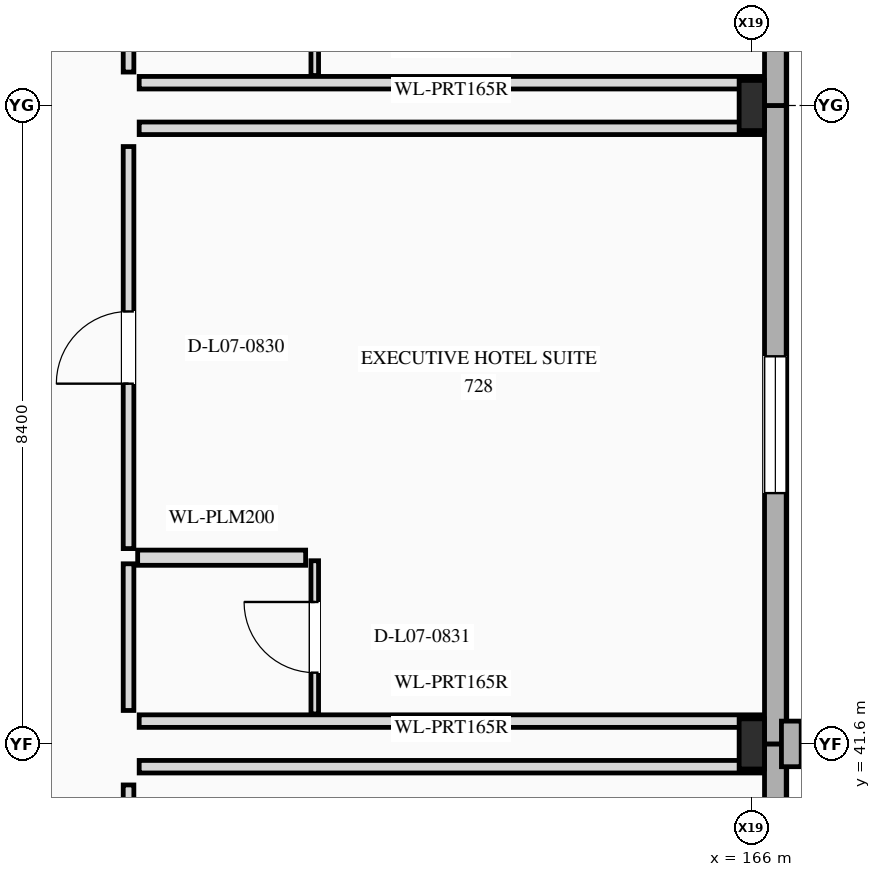
"""IFC4 building model, lengths in metres.
Left out: names, types, materials, properties, quantities, classifications, styles, units other than length and angle.
Written with IfcOpenShell. Run it as: python <this file> out.ifc"""

import sys

from ifc_helpers import new_model, si_unit, direction, frame, frame_2d, origin, origin_2d, place, context, subcontext, project, spatial, rectangle, i_section, extrude, element, fill, save


model = new_model("IFC4")
c1 = context("Model", 3, precision=1e-05, world=origin(), true_north=direction((0.0, 1.0)))
c2 = subcontext(c1, "Body", "Model", "MODEL_VIEW")
j1 = project(units=[si_unit("LENGTHUNIT", "METRE"), si_unit("PLANEANGLEUNIT", "RADIAN")], contexts=[c1])
p1 = place(None, origin())
s1 = spatial("IfcSite", under=j1, at=p1, CompositionType="ELEMENT")
p2 = place(p1, origin())
s2 = spatial("IfcBuilding", under=s1, at=p2, CompositionType="ELEMENT")
p3 = place(p2, frame((0.0, 0.0, 30.6)))
s3 = spatial("IfcBuildingStorey", under=s2, at=p3, CompositionType="ELEMENT", Elevation=30.6)
for number, where, z_axis, x_axis in (
    (1, (166.0, 41.6, 0.0), (0.0, 0.0, 1.0), (1.0, 0.0, 0.0)),
    (2, (166.0, 50.0, 0.0), (0.0, 0.0, 1.0), (1.0, 0.0, 0.0)),
):
    element("IfcColumn", number, at=place(p3, frame(where, z_axis=z_axis, x_axis=x_axis)), inside=s3, PredefinedType="COLUMN", context=c2, shape_type="SweptSolid", body=[
        extrude(i_section(OverallWidth=0.333, OverallDepth=0.66, WebThickness=0.024, FlangeThickness=0.044, at=origin_2d()), origin(), (0.0, 0.0, 1.0), 3.5),
    ])
p4 = place(p3, frame((166.31, 39.46, 0.0), z_axis=(0.0, 0.0, 1.0), x_axis=(0.0, 1.0, 0.0)))
e3 = element("IfcWall", 3, at=p4, inside=s3, PredefinedType="STANDARD", context=c2, shape_type="SweptSolid", body=[
    extrude(rectangle(XDim=2.14, YDim=0.285, at=frame_2d((1.07, 0.0))), origin(), (0.0, 0.0, 1.0), 3.5),
])
p5 = place(p3, frame((166.31, 41.6, 0.0), z_axis=(0.0, 0.0, 1.0), x_axis=(0.0, 1.0, 0.0)))
e4 = element("IfcWall", 4, at=p5, inside=s3, PredefinedType="STANDARD", context=c2, shape_type="SweptSolid", body=[
    extrude(rectangle(XDim=8.4, YDim=0.285, at=frame_2d((4.2, 0.0))), origin(), (0.0, 0.0, 1.0), 3.5),
])
p6 = place(p5, frame((3.3, 0.0, 0.85)))
e5 = element("IfcOpeningElement", 5, at=p6, cuts=e4, PredefinedType="OPENING", context=c2, shape_type="SweptSolid", body=[
    extrude(rectangle(XDim=1.8, YDim=1.8, at=frame_2d((0.9, 0.9))), frame((0.0, 0.152, 0.0), z_axis=(0.0, -1.0, 0.0), x_axis=(1.0, 0.0, 0.0)), (0.0, 0.0, 1.0), 0.305),
])
p7 = place(p3, frame((166.52, 41.3, 0.0), z_axis=(0.0, 0.0, 1.0), x_axis=(0.0, 1.0, 0.0)))
e6 = element("IfcWall", 6, at=p7, inside=s3, PredefinedType="ELEMENTEDWALL", context=c2, shape_type="SweptSolid", body=[
    extrude(rectangle(XDim=0.6, YDim=0.26, at=frame_2d((0.3, 0.0))), origin(), (0.0, 0.0, 1.0), 3.5),
])
p8 = place(p3, frame((166.31, 50.0, 0.0), z_axis=(0.0, 0.0, 1.0), x_axis=(0.0, 1.0, 0.0)))
e7 = element("IfcWall", 7, at=p8, inside=s3, PredefinedType="STANDARD", context=c2, shape_type="SweptSolid", body=[
    extrude(rectangle(XDim=1.34, YDim=0.285, at=frame_2d((0.67, 0.0))), origin(), (0.0, 0.0, 1.0), 3.5),
])
p9 = place(p3, frame((157.8, 35.77, 0.0), z_axis=(0.0, 0.0, 1.0), x_axis=(0.0, 1.0, 0.0)))
e8 = element("IfcWall", 8, at=p9, inside=s3, PredefinedType="PARTITIONING", context=c2, shape_type="SweptSolid", body=[
    extrude(rectangle(XDim=5.29, YDim=0.14, at=frame_2d((2.645, 0.0))), origin(), (0.0, 0.0, 1.0), 3.2),
])
p10 = place(p9, frame((2.11, 0.0, 0.0)))
e9 = element("IfcOpeningElement", 9, at=p10, cuts=e8, PredefinedType="OPENING", context=c2, shape_type="SweptSolid", body=[
    extrude(rectangle(XDim=1.07, YDim=2.4, at=frame_2d((0.535, 1.2))), frame((0.0, 0.08, 0.0), z_axis=(0.0, -1.0, 0.0), x_axis=(1.0, 0.0, 0.0)), (0.0, 0.0, 1.0), 0.16),
])
p11 = place(p3, frame((157.94, 41.3, 0.0), z_axis=(0.0, 0.0, 1.0), x_axis=(1.0, 0.0, 0.0)))
e10 = element("IfcWall", 10, at=p11, inside=s3, PredefinedType="PARTITIONING", context=c2, shape_type="SweptSolid", body=[
    extrude(rectangle(XDim=8.213, YDim=0.165, at=frame_2d((4.106, 0.0))), origin(), (0.0, 0.0, 1.0), 2.59),
])
p12 = place(p3, frame((157.8, 42.04, 0.0), z_axis=(0.0, 0.0, 1.0), x_axis=(0.0, 1.0, 0.0)))
e11 = element("IfcWall", 11, at=p12, inside=s3, PredefinedType="PARTITIONING", context=c2, shape_type="SweptSolid", body=[
    extrude(rectangle(XDim=1.93, YDim=0.14, at=frame_2d((0.965, 0.0))), origin(), (0.0, 0.0, 1.0), 2.753),
])
p13 = place(p3, frame((157.8, 44.17, 0.0), z_axis=(0.0, 0.0, 1.0), x_axis=(0.0, 1.0, 0.0)))
e12 = element("IfcWall", 12, at=p13, inside=s3, PredefinedType="PARTITIONING", context=c2, shape_type="SweptSolid", body=[
    extrude(rectangle(XDim=5.29, YDim=0.14, at=frame_2d((2.645, 0.0))), origin(), (0.0, 0.0, 1.0), 2.753),
])
p14 = place(p13, frame((2.17, 0.0, 0.0)))
e13 = element("IfcOpeningElement", 13, at=p14, cuts=e12, PredefinedType="OPENING", context=c2, shape_type="SweptSolid", body=[
    extrude(rectangle(XDim=0.95, YDim=2.15, at=frame_2d((0.475, 1.075))), frame((0.0, 0.08, 0.0), z_axis=(0.0, -1.0, 0.0), x_axis=(1.0, 0.0, 0.0)), (0.0, 0.0, 1.0), 0.16),
])
for number, where, z_axis, x_axis in (
    (14, (157.94, 41.9, 0.0), (0.0, 0.0, 1.0), (1.0, 0.0, 0.0)),
    (15, (157.94, 49.7, 0.0), (0.0, 0.0, 1.0), (1.0, 0.0, 0.0)),
):
    element("IfcWall", number, at=place(p3, frame(where, z_axis=z_axis, x_axis=x_axis)), inside=s3, PredefinedType="PARTITIONING", context=c2, shape_type="SweptSolid", body=[
        extrude(rectangle(XDim=8.213, YDim=0.165, at=frame_2d((4.106, 0.0))), origin(), (0.0, 0.0, 1.0), 2.59),
    ])
p15 = place(p3, frame((157.92, 44.05, 0.0), z_axis=(0.0, 0.0, 1.0), x_axis=(1.0, 0.0, 0.0)))
e16 = element("IfcWall", 16, at=p15, inside=s3, PredefinedType="PLUMBINGWALL", context=c2, shape_type="SweptSolid", body=[
    extrude(rectangle(XDim=2.21, YDim=0.2, at=frame_2d((1.105, 0.0))), origin(), (0.0, 0.0, 1.0), 3.2),
])
p16 = place(p3, frame((160.25, 41.994, 0.0), z_axis=(0.0, 0.0, 1.0), x_axis=(0.0, 1.0, 0.0)))
e17 = element("IfcWall", 17, at=p16, inside=s3, PredefinedType="PARTITIONING", context=c2, shape_type="SweptSolid", body=[
    extrude(rectangle(XDim=2.016, YDim=0.1, at=frame_2d((1.008, 0.0))), origin(), (0.0, 0.0, 1.0), 2.753),
])
p17 = place(p16, frame((0.543, 0.0, 0.0)))
e18 = element("IfcOpeningElement", 18, at=p17, cuts=e17, PredefinedType="OPENING", context=c2, shape_type="SweptSolid", body=[
    extrude(rectangle(XDim=0.93, YDim=2.14, at=frame_2d((0.465, 1.07))), frame((0.0, 0.06, 0.0), z_axis=(0.0, -1.0, 0.0), x_axis=(1.0, 0.0, 0.0)), (0.0, 0.0, 1.0), 0.12),
])
p18 = place(p3, frame((157.8, 50.44, 0.0), z_axis=(0.0, 0.0, 1.0), x_axis=(0.0, 1.0, 0.0)))
e19 = element("IfcWall", 19, at=p18, inside=s3, PredefinedType="PARTITIONING", context=c2, shape_type="SweptSolid", body=[
    extrude(rectangle(XDim=1.93, YDim=0.14, at=frame_2d((0.965, 0.0))), origin(), (0.0, 0.0, 1.0), 3.2),
])
p19 = place(p3, frame((157.94, 50.3, 0.0), z_axis=(0.0, 0.0, 1.0), x_axis=(1.0, 0.0, 0.0)))
e20 = element("IfcWall", 20, at=p19, inside=s3, PredefinedType="PARTITIONING", context=c2, shape_type="SweptSolid", body=[
    extrude(rectangle(XDim=8.213, YDim=0.165, at=frame_2d((4.106, 0.0))), origin(), (0.0, 0.0, 1.0), 2.59),
])
p20 = place(p3, frame((160.25, 50.395, 0.0), z_axis=(0.0, 0.0, 1.0), x_axis=(0.0, 1.0, 0.0)))
e21 = element("IfcWall", 21, at=p20, inside=s3, PredefinedType="PARTITIONING", context=c2, shape_type="SweptSolid", body=[
    extrude(rectangle(XDim=2.015, YDim=0.1, at=frame_2d((1.008, 0.0))), origin(), (0.0, 0.0, 1.0), 3.2),
])
p21 = place(p20, frame((0.53, 0.0, 0.0)))
e22 = element("IfcOpeningElement", 22, at=p21, cuts=e21, PredefinedType="OPENING", context=c2, shape_type="SweptSolid", body=[
    extrude(rectangle(XDim=0.955, YDim=2.14, at=frame_2d((0.478, 1.07))), frame((0.0, 0.06, 0.0), z_axis=(0.0, -1.0, 0.0), x_axis=(1.0, 0.0, 0.0)), (0.0, 0.0, 1.0), 0.12),
])
p22 = place(p6, origin())
e23 = element("IfcWindow", 23, at=p22, inside=s3, PartitioningType="SINGLE_PANEL", PredefinedType="WINDOW", context=c2, shape_type="SweptSolid", body=[
    extrude(rectangle(XDim=1.8, YDim=1.8, at=frame_2d((0.9, 0.9))), frame((0.0, 0.03, 0.0), z_axis=(0.0, -1.0, 0.0), x_axis=(1.0, 0.0, 0.0)), (0.0, 0.0, 1.0), 0.06),
])
fill(e5, e23)
p23 = place(p14, origin())
e24 = element("IfcDoor", 24, at=p23, inside=s3, OperationType="SINGLE_SWING_LEFT", PredefinedType="DOOR", context=c2, shape_type="SweptSolid", body=[
    extrude(rectangle(XDim=0.95, YDim=2.15, at=frame_2d((0.475, 1.075))), frame((0.0, 0.025, 0.0), z_axis=(0.0, -1.0, 0.0), x_axis=(1.0, 0.0, 0.0)), (0.0, 0.0, 1.0), 0.05),
])
fill(e13, e24)
p24 = place(p17, origin())
e25 = element("IfcDoor", 25, at=p24, inside=s3, OperationType="SINGLE_SWING_RIGHT", PredefinedType="DOOR", context=c2, shape_type="SweptSolid", body=[
    extrude(rectangle(XDim=0.93, YDim=2.14, at=frame_2d((0.465, 1.07))), frame((0.0, 0.025, 0.0), z_axis=(0.0, -1.0, 0.0), x_axis=(1.0, 0.0, 0.0)), (0.0, 0.0, 1.0), 0.05),
])
fill(e18, e25)
save(model, sys.argv[1])
